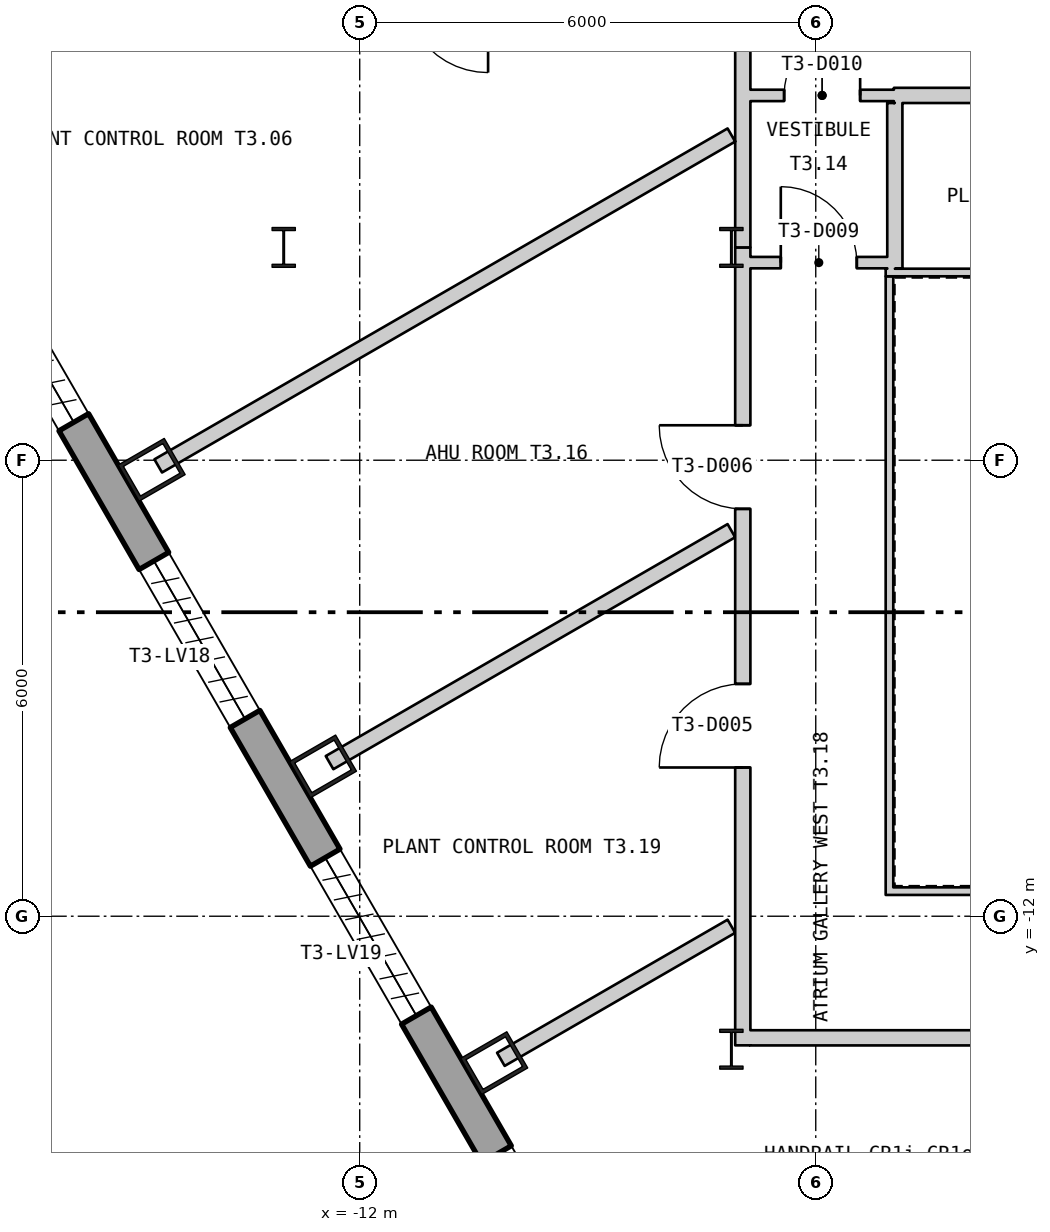
"""IFC4 building model, lengths in metres.
Left out: names, types, materials, properties, quantities, classifications, styles, units other than length and angle.
Written with IfcOpenShell. Run it as: python <this file> out.ifc"""

import sys

from ifc_helpers import new_model, si_unit, direction, frame, frame_2d, origin, origin_2d, place, context, subcontext, project, spatial, polyline, rectangle, hollow_rectangle, i_section, outline, extrude, element, fill, save


model = new_model("IFC4")
c1 = context("Model", 3, precision=1e-05, world=origin(), true_north=direction((0.0, 1.0)))
c2 = subcontext(c1, "Body", "Model", "MODEL_VIEW")
j1 = project(units=[si_unit("LENGTHUNIT", "METRE"), si_unit("PLANEANGLEUNIT", "RADIAN")], contexts=[c1])
p1 = place(None, origin())
s1 = spatial("IfcSite", under=j1, at=p1, CompositionType="ELEMENT")
p2 = place(p1, origin())
s2 = spatial("IfcBuilding", under=s1, at=p2, CompositionType="ELEMENT")
p3 = place(p2, frame((0.0, 0.0, 186.6)))
s3 = spatial("IfcBuildingStorey", under=s2, at=p3, CompositionType="ELEMENT", Elevation=186.6)
for number, where, z_axis, x_axis in (
    (1, (-14.737, -6.126, 0.0), (0.0, 0.0, 1.0), (0.5, -0.866, 0.0)),
    (2, (-12.483, -10.029, 0.0), (0.0, 0.0, 1.0), (0.5, -0.866, 0.0)),
    (3, (-10.23, -13.933, 0.0), (0.0, 0.0, 1.0), (0.5, -0.866, 0.0)),
):
    element("IfcColumn", number, at=place(p3, frame(where, z_axis=z_axis, x_axis=x_axis)), inside=s3, PredefinedType="COLUMN", context=c2, shape_type="SweptSolid", body=[
        extrude(hollow_rectangle(XDim=0.55, YDim=0.7, WallThickness=0.05, at=origin_2d()), origin(), (0.0, 0.0, 1.0), 6.0),
    ])
for number, where, z_axis, x_axis in (
    (4, (-7.11, -3.2, 0.0), (0.0, 0.0, 1.0), (1.0, 0.0, 0.0)),
    (5, (-7.11, -13.75, 0.0), (0.0, 0.0, 1.0), (1.0, 0.0, 0.0)),
    (6, (-13.0, -3.2, 0.0), (0.0, 0.0, 1.0), (1.0, 0.0, 0.0)),
):
    element("IfcColumn", number, at=place(p3, frame(where, z_axis=z_axis, x_axis=x_axis)), inside=s3, PredefinedType="COLUMN", context=c2, shape_type="SweptSolid", body=[
        extrude(i_section(OverallWidth=0.306, OverallDepth=0.524, WebThickness=0.021, FlangeThickness=0.04, at=origin_2d()), origin(), (0.0, 0.0, 1.0), 6.0),
    ])
p4 = place(p3, frame((-26.67, 13.393, -0.18), z_axis=(0.0, 0.0, 1.0), x_axis=(0.500000711659, -0.866024992908, 0.0)))
e7 = element("IfcWall", 7, at=p4, inside=s3, PredefinedType="SOLIDWALL", context=c2, shape_type="SweptSolid", body=[
    extrude(outline(polyline([(-0.13, -0.225), (45.87, -0.225), (45.61, 0.225), (0.13, 0.225), (-0.13, -0.225)])), origin(), (0.0, 0.0, 1.0), 6.0),
])
p5 = place(p4, frame((1.424, 0.0, 1.38)))
e8 = element("IfcOpeningElement", 8, at=p5, cuts=e7, PredefinedType="OPENING", context=c2, shape_type="SweptSolid", body=[
    extrude(rectangle(XDim=2.4, YDim=3.6, at=frame_2d((1.2, 1.8))), frame((0.0, 0.235, 0.0), z_axis=(0.0, -1.0, 0.0), x_axis=(1.0, 0.0, 0.0)), (0.0, 0.0, 1.0), 0.47),
])
p6 = place(p4, frame((5.893, 0.0, 1.38)))
e9 = element("IfcOpeningElement", 9, at=p6, cuts=e7, PredefinedType="OPENING", context=c2, shape_type="SweptSolid", body=[
    extrude(rectangle(XDim=2.4, YDim=3.6, at=frame_2d((1.2, 1.8))), frame((0.0, 0.235, 0.0), z_axis=(0.0, -1.0, 0.0), x_axis=(1.0, 0.0, 0.0)), (0.0, 0.0, 1.0), 0.47),
])
p7 = place(p4, frame((10.401, 0.0, 1.38)))
e10 = element("IfcOpeningElement", 10, at=p7, cuts=e7, PredefinedType="OPENING", context=c2, shape_type="SweptSolid", body=[
    extrude(rectangle(XDim=2.4, YDim=3.6, at=frame_2d((1.2, 1.8))), frame((0.0, 0.235, 0.0), z_axis=(0.0, -1.0, 0.0), x_axis=(1.0, 0.0, 0.0)), (0.0, 0.0, 1.0), 0.47),
])
p8 = place(p4, frame((14.909, 0.0, 1.38)))
e11 = element("IfcOpeningElement", 11, at=p8, cuts=e7, PredefinedType="OPENING", context=c2, shape_type="SweptSolid", body=[
    extrude(rectangle(XDim=2.4, YDim=3.6, at=frame_2d((1.2, 1.8))), frame((0.0, 0.235, 0.0), z_axis=(0.0, -1.0, 0.0), x_axis=(1.0, 0.0, 0.0)), (0.0, 0.0, 1.0), 0.47),
])
p9 = place(p4, frame((19.416, 0.0, 1.38)))
e12 = element("IfcOpeningElement", 12, at=p9, cuts=e7, PredefinedType="OPENING", context=c2, shape_type="SweptSolid", body=[
    extrude(rectangle(XDim=2.4, YDim=3.6, at=frame_2d((1.2, 1.8))), frame((0.0, 0.235, 0.0), z_axis=(0.0, -1.0, 0.0), x_axis=(1.0, 0.0, 0.0)), (0.0, 0.0, 1.0), 0.47),
])
p10 = place(p4, frame((23.924, 0.0, 1.38)))
e13 = element("IfcOpeningElement", 13, at=p10, cuts=e7, PredefinedType="OPENING", context=c2, shape_type="SweptSolid", body=[
    extrude(rectangle(XDim=2.4, YDim=3.6, at=frame_2d((1.2, 1.8))), frame((0.0, 0.235, 0.0), z_axis=(0.0, -1.0, 0.0), x_axis=(1.0, 0.0, 0.0)), (0.0, 0.0, 1.0), 0.47),
])
p11 = place(p4, frame((28.431, 0.0, 1.38)))
e14 = element("IfcOpeningElement", 14, at=p11, cuts=e7, PredefinedType="OPENING", context=c2, shape_type="SweptSolid", body=[
    extrude(rectangle(XDim=2.4, YDim=3.6, at=frame_2d((1.2, 1.8))), frame((0.0, 0.235, 0.0), z_axis=(0.0, -1.0, 0.0), x_axis=(1.0, 0.0, 0.0)), (0.0, 0.0, 1.0), 0.47),
])
p12 = place(p4, frame((32.939, 0.0, 1.38)))
e15 = element("IfcOpeningElement", 15, at=p12, cuts=e7, PredefinedType="OPENING", context=c2, shape_type="SweptSolid", body=[
    extrude(rectangle(XDim=2.4, YDim=3.6, at=frame_2d((1.2, 1.8))), frame((0.0, 0.235, 0.0), z_axis=(0.0, -1.0, 0.0), x_axis=(1.0, 0.0, 0.0)), (0.0, 0.0, 1.0), 0.47),
])
p13 = place(p4, frame((37.447, 0.0, 1.38)))
e16 = element("IfcOpeningElement", 16, at=p13, cuts=e7, PredefinedType="OPENING", context=c2, shape_type="SweptSolid", body=[
    extrude(rectangle(XDim=2.4, YDim=3.6, at=frame_2d((1.2, 1.8))), frame((0.0, 0.235, 0.0), z_axis=(0.0, -1.0, 0.0), x_axis=(1.0, 0.0, 0.0)), (0.0, 0.0, 1.0), 0.47),
])
p14 = place(p4, frame((41.916, 0.0, 1.38)))
e17 = element("IfcOpeningElement", 17, at=p14, cuts=e7, PredefinedType="OPENING", context=c2, shape_type="SweptSolid", body=[
    extrude(rectangle(XDim=2.4, YDim=3.6, at=frame_2d((1.2, 1.8))), frame((0.0, 0.235, 0.0), z_axis=(0.0, -1.0, 0.0), x_axis=(1.0, 0.0, 0.0)), (0.0, 0.0, 1.0), 0.47),
])
for number, where, z_axis, x_axis in (
    (18, (-5.08, -11.67, 0.0), (0.0, 0.0, 1.0), (1.0, 0.0, 0.0)),
    (19, (5.08, -3.53, 0.0), (0.0, 0.0, 1.0), (-1.0, 0.0, 0.0)),
):
    element("IfcWall", number, at=place(p3, frame(where, z_axis=z_axis, x_axis=x_axis)), inside=s3, PredefinedType="PARTITIONING", context=c2, shape_type="SweptSolid", body=[
        extrude(rectangle(XDim=10.16, YDim=0.1, at=frame_2d((5.08, 0.0))), origin(), (0.0, 0.0, 1.0), 5.8),
    ])
p15 = place(p3, frame((-5.03, -3.58, 0.0), z_axis=(0.0, 0.0, 1.0), x_axis=(0.0, -1.0, 0.0)))
e20 = element("IfcWall", 20, at=p15, inside=s3, PredefinedType="PARTITIONING", context=c2, shape_type="SweptSolid", body=[
    extrude(rectangle(XDim=8.04, YDim=0.1, at=frame_2d((4.02, 0.0))), origin(), (0.0, 0.0, 1.0), 5.8),
])
p16 = place(p3, frame((-14.651, -6.075, 0.0), z_axis=(0.0, 0.0, 1.0), x_axis=(0.866015377534, 0.500017365573, 0.0)))
e21 = element("IfcWall", 21, at=p16, inside=s3, PredefinedType="PARTITIONING", context=c2, shape_type="SweptSolid", body=[
    extrude(rectangle(XDim=8.708, YDim=0.2, at=frame_2d((4.354, 0.0))), origin(), (0.0, 0.0, 1.0), 5.8),
])
p17 = place(p3, frame((-12.397, -9.979, 0.0), z_axis=(0.0, 0.0, 1.0), x_axis=(0.866057383041, 0.499944606212, 0.0)))
e22 = element("IfcWall", 22, at=p17, inside=s3, PredefinedType="PARTITIONING", context=c2, shape_type="SweptSolid", body=[
    extrude(rectangle(XDim=6.105, YDim=0.2, at=frame_2d((3.052, 0.0))), origin(), (0.0, 0.0, 1.0), 5.8),
])
p18 = place(p3, frame((-10.143, -13.883, 0.0), z_axis=(0.0, 0.0, 1.0), x_axis=(0.866038183914, 0.499977863513, 0.0)))
e23 = element("IfcWall", 23, at=p18, inside=s3, PredefinedType="PARTITIONING", context=c2, shape_type="SweptSolid", body=[
    extrude(rectangle(XDim=3.502, YDim=0.2, at=frame_2d((1.751, 0.0))), origin(), (0.0, 0.0, 1.0), 5.8),
])
p19 = place(p3, frame((-6.96, -13.699, 0.0), z_axis=(0.0, 0.0, 1.0), x_axis=(0.0, 1.0, 0.0)))
e24 = element("IfcWall", 24, at=p19, inside=s3, PredefinedType="PARTITIONING", context=c2, shape_type="SweptSolid", body=[
    extrude(rectangle(XDim=10.499, YDim=0.2, at=frame_2d((5.25, 0.0))), origin(), (0.0, 0.0, 1.0), 5.21),
])
p20 = place(p19, frame((3.656, 0.0, 0.0)))
e25 = element("IfcOpeningElement", 25, at=p20, cuts=e24, PredefinedType="OPENING", context=c2, shape_type="SweptSolid", body=[
    extrude(rectangle(XDim=1.1, YDim=2.1, at=frame_2d((0.55, 1.05))), frame((0.0, 0.11, 0.0), z_axis=(0.0, -1.0, 0.0), x_axis=(1.0, 0.0, 0.0)), (0.0, 0.0, 1.0), 0.22),
])
p21 = place(p19, frame((7.059, 0.0, 0.0)))
e26 = element("IfcOpeningElement", 26, at=p21, cuts=e24, PredefinedType="OPENING", context=c2, shape_type="SweptSolid", body=[
    extrude(rectangle(XDim=1.1, YDim=2.1, at=frame_2d((0.55, 1.05))), frame((0.0, 0.11, 0.0), z_axis=(0.0, -1.0, 0.0), x_axis=(1.0, 0.0, 0.0)), (0.0, 0.0, 1.0), 0.22),
])
p22 = place(p3, frame((-6.96, -3.2, 0.0), z_axis=(0.0, 0.0, 1.0), x_axis=(0.0, 1.0, 0.0)))
e27 = element("IfcWall", 27, at=p22, inside=s3, PredefinedType="PARTITIONING", context=c2, shape_type="SweptSolid", body=[
    extrude(rectangle(XDim=3.398, YDim=0.2, at=frame_2d((1.699, 0.0))), origin(), (0.0, 0.0, 1.0), 5.8),
])
p23 = place(p3, frame((-6.86, -13.6, 0.0), z_axis=(0.0, 0.0, 1.0), x_axis=(1.0, 0.0, 0.0)))
e28 = element("IfcWall", 28, at=p23, inside=s3, PredefinedType="PARTITIONING", context=c2, shape_type="SweptSolid", body=[
    extrude(rectangle(XDim=5.16, YDim=0.2, at=frame_2d((2.58, 0.0))), origin(), (0.0, 0.0, 1.0), 5.01),
])
p24 = place(p23, frame((2.949, 0.0, 0.0)))
e29 = element("IfcOpeningElement", 29, at=p24, cuts=e28, PredefinedType="OPENING", context=c2, shape_type="SweptSolid", body=[
    extrude(rectangle(XDim=1.1, YDim=2.1, at=frame_2d((0.55, 1.05))), frame((0.0, 0.11, 0.0), z_axis=(0.0, -1.0, 0.0), x_axis=(1.0, 0.0, 0.0)), (0.0, 0.0, 1.0), 0.22),
])
p25 = place(p3, frame((-6.86, -3.4, 0.0), z_axis=(0.0, 0.0, 1.0), x_axis=(1.0, 0.0, 0.0)))
e30 = element("IfcWall", 30, at=p25, inside=s3, PredefinedType="PARTITIONING", context=c2, shape_type="SweptSolid", body=[
    extrude(rectangle(XDim=1.801, YDim=0.15, at=frame_2d((0.9, 0.0))), origin(), (0.0, 0.0, 1.0), 5.8),
])
p26 = place(p25, frame((0.4, 0.0, 0.0)))
e31 = element("IfcOpeningElement", 31, at=p26, cuts=e30, PredefinedType="OPENING", context=c2, shape_type="SweptSolid", body=[
    extrude(rectangle(XDim=1.0, YDim=2.1, at=frame_2d((0.5, 1.05))), frame((0.0, 0.085, 0.0), z_axis=(0.0, -1.0, 0.0), x_axis=(1.0, 0.0, 0.0)), (0.0, 0.0, 1.0), 0.17),
])
p27 = place(p3, frame((-6.86, -1.2, 0.0), z_axis=(0.0, 0.0, 1.0), x_axis=(1.0, 0.0, 0.0)))
e32 = element("IfcWall", 32, at=p27, inside=s3, PredefinedType="PARTITIONING", context=c2, shape_type="SweptSolid", body=[
    extrude(rectangle(XDim=1.888, YDim=0.15, at=frame_2d((0.944, 0.0))), origin(), (0.0, 0.0, 1.0), 5.8),
])
p28 = place(p27, frame((0.444, 0.0, 0.0)))
e33 = element("IfcOpeningElement", 33, at=p28, cuts=e32, PredefinedType="OPENING", context=c2, shape_type="SweptSolid", body=[
    extrude(rectangle(XDim=1.0, YDim=2.1, at=frame_2d((0.5, 1.05))), frame((0.0, 0.085, 0.0), z_axis=(0.0, -1.0, 0.0), x_axis=(1.0, 0.0, 0.0)), (0.0, 0.0, 1.0), 0.17),
])
p29 = place(p3, frame((-4.972, -1.2, 0.0), z_axis=(0.0, 0.0, 1.0), x_axis=(1.0, 0.0, 0.0)))
e34 = element("IfcWall", 34, at=p29, inside=s3, PredefinedType="PARTITIONING", context=c2, shape_type="SweptSolid", body=[
    extrude(rectangle(XDim=12.032, YDim=0.2, at=frame_2d((6.016, 0.0))), origin(), (0.0, 0.0, 1.0), 5.8),
])
p30 = place(p29, frame((3.671, 0.0, 0.0)))
e35 = element("IfcOpeningElement", 35, at=p30, cuts=e34, PredefinedType="OPENING", context=c2, shape_type="SweptSolid", body=[
    extrude(rectangle(XDim=1.1, YDim=2.1, at=frame_2d((0.55, 1.05))), frame((0.0, 0.11, 0.0), z_axis=(0.0, -1.0, 0.0), x_axis=(1.0, 0.0, 0.0)), (0.0, 0.0, 1.0), 0.22),
])
p31 = place(p29, frame((5.174, 0.0, 0.0)))
e36 = element("IfcOpeningElement", 36, at=p31, cuts=e34, PredefinedType="OPENING", context=c2, shape_type="SweptSolid", body=[
    extrude(rectangle(XDim=1.1, YDim=2.1, at=frame_2d((0.55, 1.05))), frame((0.0, 0.11, 0.0), z_axis=(0.0, -1.0, 0.0), x_axis=(1.0, 0.0, 0.0)), (0.0, 0.0, 1.0), 0.22),
])
p32 = place(p3, frame((-4.959, -3.48, 0.0), z_axis=(0.0, 0.0, 1.0), x_axis=(-0.000458715548, 0.99999989479, 0.0)))
e37 = element("IfcWall", 37, at=p32, inside=s3, PredefinedType="PARTITIONING", context=c2, shape_type="SweptSolid", body=[
    extrude(rectangle(XDim=2.18, YDim=0.2, at=frame_2d((1.09, 0.0))), origin(), (0.0, 0.0, 1.0), 5.8),
])
p33 = place(p20, origin())
e38 = element("IfcDoor", 38, at=p33, inside=s3, OperationType="SINGLE_SWING_RIGHT", PredefinedType="DOOR", context=c2, shape_type="SweptSolid", body=[
    extrude(rectangle(XDim=1.1, YDim=2.1, at=frame_2d((0.55, 1.05))), frame((0.0, 0.025, 0.0), z_axis=(0.0, -1.0, 0.0), x_axis=(1.0, 0.0, 0.0)), (0.0, 0.0, 1.0), 0.05),
])
fill(e25, e38)
p34 = place(p21, origin())
e39 = element("IfcDoor", 39, at=p34, inside=s3, OperationType="SINGLE_SWING_LEFT", PredefinedType="DOOR", context=c2, shape_type="SweptSolid", body=[
    extrude(rectangle(XDim=1.1, YDim=2.1, at=frame_2d((0.55, 1.05))), frame((0.0, 0.025, 0.0), z_axis=(0.0, -1.0, 0.0), x_axis=(1.0, 0.0, 0.0)), (0.0, 0.0, 1.0), 0.05),
])
fill(e26, e39)
p35 = place(p26, origin())
e40 = element("IfcDoor", 40, at=p35, inside=s3, OperationType="SINGLE_SWING_RIGHT", PredefinedType="DOOR", context=c2, shape_type="SweptSolid", body=[
    extrude(rectangle(XDim=1.0, YDim=2.1, at=frame_2d((0.5, 1.05))), frame((0.0, 0.025, 0.0), z_axis=(0.0, -1.0, 0.0), x_axis=(1.0, 0.0, 0.0)), (0.0, 0.0, 1.0), 0.05),
])
fill(e31, e40)
p36 = place(p28, origin())
e41 = element("IfcDoor", 41, at=p36, inside=s3, OperationType="SINGLE_SWING_LEFT", PredefinedType="DOOR", context=c2, shape_type="SweptSolid", body=[
    extrude(rectangle(XDim=1.0, YDim=2.1, at=frame_2d((0.5, 1.05))), frame((0.0, 0.025, 0.0), z_axis=(0.0, -1.0, 0.0), x_axis=(1.0, 0.0, 0.0)), (0.0, 0.0, 1.0), 0.05),
])
fill(e33, e41)
save(model, sys.argv[1])
